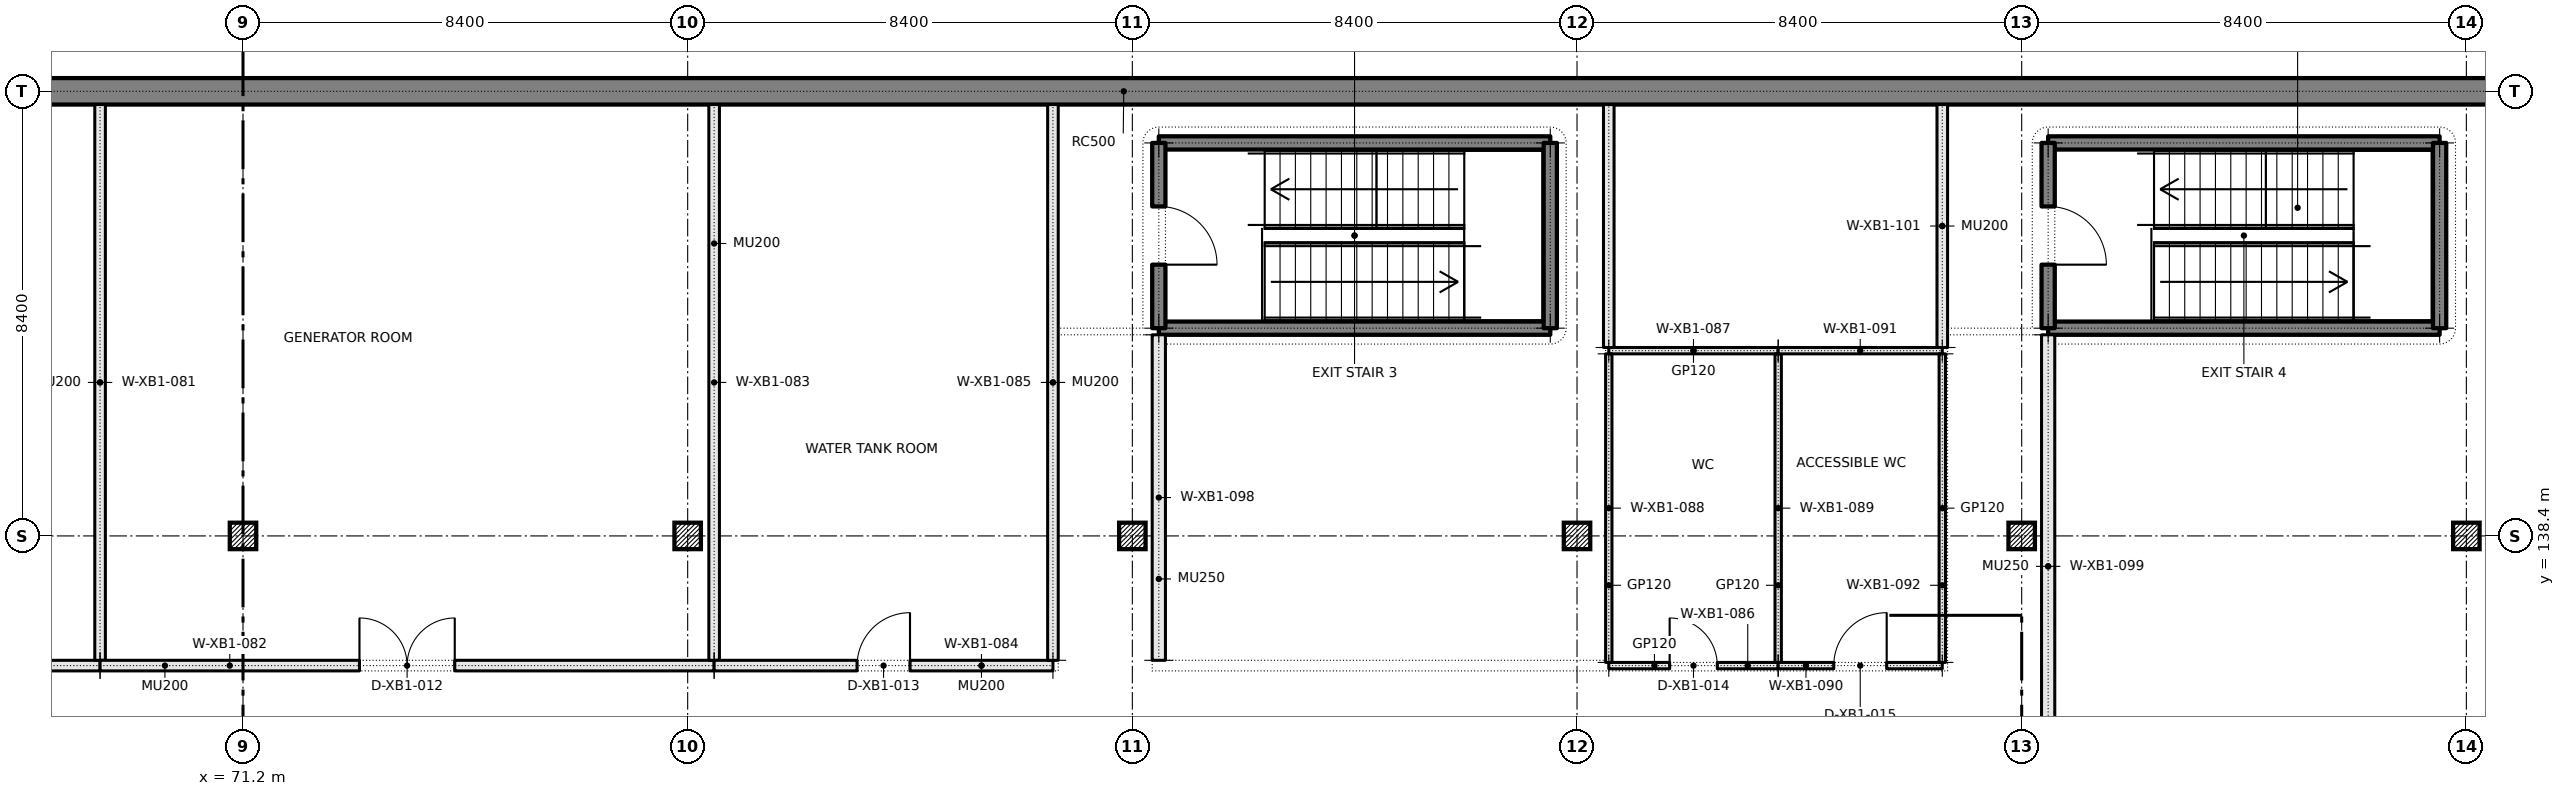
"""IFC4 building model, lengths in metres.
Left out: names, types, materials, properties, quantities, classifications, styles, units other than length and angle.
Written with IfcOpenShell. Run it as: python <this file> out.ifc"""

import sys

from ifc_helpers import new_model, si_unit, direction, frame, frame_2d, origin, origin_2d, place, context, subcontext, project, spatial, rectangle, extrude, element, fill, save


model = new_model("IFC4")
c1 = context("Model", 3, precision=1e-05, world=origin(), true_north=direction((0.0, 1.0)))
c2 = subcontext(c1, "Body", "Model", "MODEL_VIEW")
j1 = project(units=[si_unit("LENGTHUNIT", "METRE"), si_unit("PLANEANGLEUNIT", "RADIAN")], contexts=[c1])
p1 = place(None, origin())
s1 = spatial("IfcSite", under=j1, at=p1, CompositionType="ELEMENT")
p2 = place(p1, origin())
s2 = spatial("IfcBuilding", under=s1, at=p2, CompositionType="ELEMENT")
p3 = place(p2, frame((0.0, 0.0, -4.6)))
s3 = spatial("IfcBuildingStorey", under=s2, at=p3, CompositionType="ELEMENT", Elevation=-4.6)
p4 = place(p3, frame((4.25, 146.8, 0.0), z_axis=(0.0, 0.0, 1.0), x_axis=(1.0, 0.0, 0.0)))
e1 = element("IfcWall", 1, at=p4, inside=s3, PredefinedType="SOLIDWALL", context=c2, shape_type="SweptSolid", body=[
    extrude(rectangle(XDim=110.2, YDim=0.5, at=frame_2d((55.1, 0.0))), origin(), (0.0, 0.0, 1.0), 4.19),
])
for number, where, z_axis, x_axis in (
    (2, (71.2, 138.4, 0.0), (0.0, 0.0, 1.0), (1.0, 0.0, 0.0)),
    (3, (79.6, 138.4, 0.0), (0.0, 0.0, 1.0), (1.0, 0.0, 0.0)),
    (4, (88.0, 138.4, 0.0), (0.0, 0.0, 1.0), (1.0, 0.0, 0.0)),
    (5, (96.4, 138.4, 0.0), (0.0, 0.0, 1.0), (1.0, 0.0, 0.0)),
    (6, (104.8, 138.4, 0.0), (0.0, 0.0, 1.0), (1.0, 0.0, 0.0)),
    (7, (113.2, 138.4, 0.0), (0.0, 0.0, 1.0), (1.0, 0.0, 0.0)),
):
    element("IfcColumn", number, at=place(p3, frame(where, z_axis=z_axis, x_axis=x_axis)), inside=s3, PredefinedType="COLUMN", context=c2, shape_type="SweptSolid", body=[
        extrude(rectangle(XDim=0.5, YDim=0.5, at=origin_2d()), origin(), (0.0, 0.0, 1.0), 4.6),
    ])
for number, where, z_axis, x_axis in (
    (8, (88.5, 142.325, 0.0), (0.0, 0.0, 1.0), (1.0, 0.0, 0.0)),
    (9, (88.5, 145.825, 0.0), (0.0, 0.0, 1.0), (1.0, 0.0, 0.0)),
):
    element("IfcWall", number, at=place(p3, frame(where, z_axis=z_axis, x_axis=x_axis)), inside=s3, PredefinedType="SOLIDWALL", context=c2, shape_type="SweptSolid", body=[
        extrude(rectangle(XDim=7.395, YDim=0.25, at=frame_2d((3.698, 0.0))), origin(), (0.0, 0.0, 1.0), 4.19),
    ])
p5 = place(p3, frame((88.5, 142.325, 0.0), z_axis=(0.0, 0.0, 1.0), x_axis=(0.0, 1.0, 0.0)))
e10 = element("IfcWall", 10, at=p5, inside=s3, PredefinedType="SOLIDWALL", context=c2, shape_type="SweptSolid", body=[
    extrude(rectangle(XDim=3.5, YDim=0.25, at=frame_2d((1.75, 0.0))), origin(), (0.0, 0.0, 1.0), 4.19),
])
p6 = place(p5, frame((1.2, 0.0, 0.0)))
e11 = element("IfcOpeningElement", 11, at=p6, cuts=e10, PredefinedType="OPENING", context=c2, shape_type="SweptSolid", body=[
    extrude(rectangle(XDim=1.1, YDim=2.1, at=frame_2d((0.55, 1.05))), frame((0.0, 0.135, 0.0), z_axis=(0.0, -1.0, 0.0), x_axis=(1.0, 0.0, 0.0)), (0.0, 0.0, 1.0), 0.27),
])
p7 = place(p3, frame((95.895, 142.325, 0.0), z_axis=(0.0, 0.0, 1.0), x_axis=(0.0, 1.0, 0.0)))
e12 = element("IfcWall", 12, at=p7, inside=s3, PredefinedType="SOLIDWALL", context=c2, shape_type="SweptSolid", body=[
    extrude(rectangle(XDim=3.5, YDim=0.25, at=frame_2d((1.75, 0.0))), origin(), (0.0, 0.0, 1.0), 4.19),
])
for number, where, z_axis, x_axis in (
    (13, (105.3, 142.325, 0.0), (0.0, 0.0, 1.0), (1.0, 0.0, 0.0)),
    (14, (105.3, 145.825, 0.0), (0.0, 0.0, 1.0), (1.0, 0.0, 0.0)),
):
    element("IfcWall", number, at=place(p3, frame(where, z_axis=z_axis, x_axis=x_axis)), inside=s3, PredefinedType="SOLIDWALL", context=c2, shape_type="SweptSolid", body=[
        extrude(rectangle(XDim=7.395, YDim=0.25, at=frame_2d((3.698, 0.0))), origin(), (0.0, 0.0, 1.0), 4.19),
    ])
p8 = place(p3, frame((105.3, 142.325, 0.0), z_axis=(0.0, 0.0, 1.0), x_axis=(0.0, 1.0, 0.0)))
e15 = element("IfcWall", 15, at=p8, inside=s3, PredefinedType="SOLIDWALL", context=c2, shape_type="SweptSolid", body=[
    extrude(rectangle(XDim=3.5, YDim=0.25, at=frame_2d((1.75, 0.0))), origin(), (0.0, 0.0, 1.0), 4.19),
])
p9 = place(p8, frame((1.2, 0.0, 0.0)))
e16 = element("IfcOpeningElement", 16, at=p9, cuts=e15, PredefinedType="OPENING", context=c2, shape_type="SweptSolid", body=[
    extrude(rectangle(XDim=1.1, YDim=2.1, at=frame_2d((0.55, 1.05))), frame((0.0, 0.135, 0.0), z_axis=(0.0, -1.0, 0.0), x_axis=(1.0, 0.0, 0.0)), (0.0, 0.0, 1.0), 0.27),
])
p10 = place(p3, frame((112.695, 142.325, 0.0), z_axis=(0.0, 0.0, 1.0), x_axis=(0.0, 1.0, 0.0)))
e17 = element("IfcWall", 17, at=p10, inside=s3, PredefinedType="SOLIDWALL", context=c2, shape_type="SweptSolid", body=[
    extrude(rectangle(XDim=3.5, YDim=0.25, at=frame_2d((1.75, 0.0))), origin(), (0.0, 0.0, 1.0), 4.19),
])
p11 = place(p3, frame((60.9, 135.95, 0.0), z_axis=(0.0, 0.0, 1.0), x_axis=(1.0, 0.0, 0.0)))
e18 = element("IfcWall", 18, at=p11, inside=s3, PredefinedType="SOLIDWALL", context=c2, shape_type="SweptSolid", body=[
    extrude(rectangle(XDim=7.6, YDim=0.2, at=frame_2d((3.8, 0.0))), origin(), (0.0, 0.0, 1.0), 4.19),
])
p12 = place(p11, frame((3.3, 0.0, 0.0)))
e19 = element("IfcOpeningElement", 19, at=p12, cuts=e18, PredefinedType="OPENING", context=c2, shape_type="SweptSolid", body=[
    extrude(rectangle(XDim=1.0, YDim=2.1, at=frame_2d((0.5, 1.05))), frame((0.0, 0.11, 0.0), z_axis=(0.0, -1.0, 0.0), x_axis=(1.0, 0.0, 0.0)), (0.0, 0.0, 1.0), 0.22),
])
p13 = place(p3, frame((68.5, 136.05, 0.0), z_axis=(0.0, 0.0, 1.0), x_axis=(0.0, 1.0, 0.0)))
e20 = element("IfcWall", 20, at=p13, inside=s3, PredefinedType="SOLIDWALL", context=c2, shape_type="SweptSolid", body=[
    extrude(rectangle(XDim=10.5, YDim=0.2, at=frame_2d((5.25, 0.0))), origin(), (0.0, 0.0, 1.0), 4.19),
])
p14 = place(p3, frame((68.5, 135.95, 0.0), z_axis=(0.0, 0.0, 1.0), x_axis=(1.0, 0.0, 0.0)))
e21 = element("IfcWall", 21, at=p14, inside=s3, PredefinedType="SOLIDWALL", context=c2, shape_type="SweptSolid", body=[
    extrude(rectangle(XDim=11.6, YDim=0.2, at=frame_2d((5.8, 0.0))), origin(), (0.0, 0.0, 1.0), 4.19),
])
p15 = place(p14, frame((4.9, 0.0, 0.0)))
e22 = element("IfcOpeningElement", 22, at=p15, cuts=e21, PredefinedType="OPENING", context=c2, shape_type="SweptSolid", body=[
    extrude(rectangle(XDim=1.8, YDim=2.1, at=frame_2d((0.9, 1.05))), frame((0.0, 0.11, 0.0), z_axis=(0.0, -1.0, 0.0), x_axis=(1.0, 0.0, 0.0)), (0.0, 0.0, 1.0), 0.22),
])
p16 = place(p3, frame((80.1, 136.05, 0.0), z_axis=(0.0, 0.0, 1.0), x_axis=(0.0, 1.0, 0.0)))
e23 = element("IfcWall", 23, at=p16, inside=s3, PredefinedType="SOLIDWALL", context=c2, shape_type="SweptSolid", body=[
    extrude(rectangle(XDim=10.5, YDim=0.2, at=frame_2d((5.25, 0.0))), origin(), (0.0, 0.0, 1.0), 4.19),
])
p17 = place(p3, frame((80.1, 135.95, 0.0), z_axis=(0.0, 0.0, 1.0), x_axis=(1.0, 0.0, 0.0)))
e24 = element("IfcWall", 24, at=p17, inside=s3, PredefinedType="SOLIDWALL", context=c2, shape_type="SweptSolid", body=[
    extrude(rectangle(XDim=6.4, YDim=0.2, at=frame_2d((3.2, 0.0))), origin(), (0.0, 0.0, 1.0), 4.19),
])
p18 = place(p17, frame((2.7, 0.0, 0.0)))
e25 = element("IfcOpeningElement", 25, at=p18, cuts=e24, PredefinedType="OPENING", context=c2, shape_type="SweptSolid", body=[
    extrude(rectangle(XDim=1.0, YDim=2.1, at=frame_2d((0.5, 1.05))), frame((0.0, 0.11, 0.0), z_axis=(0.0, -1.0, 0.0), x_axis=(1.0, 0.0, 0.0)), (0.0, 0.0, 1.0), 0.22),
])
p19 = place(p3, frame((86.5, 136.05, 0.0), z_axis=(0.0, 0.0, 1.0), x_axis=(0.0, 1.0, 0.0)))
e26 = element("IfcWall", 26, at=p19, inside=s3, PredefinedType="SOLIDWALL", context=c2, shape_type="SweptSolid", body=[
    extrude(rectangle(XDim=10.5, YDim=0.2, at=frame_2d((5.25, 0.0))), origin(), (0.0, 0.0, 1.0), 4.19),
])
p20 = place(p3, frame((97.0, 135.95, 0.0), z_axis=(0.0, 0.0, 1.0), x_axis=(1.0, 0.0, 0.0)))
e27 = element("IfcWall", 27, at=p20, inside=s3, PredefinedType="PARTITIONING", context=c2, shape_type="SweptSolid", body=[
    extrude(rectangle(XDim=3.2, YDim=0.12, at=frame_2d((1.6, 0.0))), origin(), (0.0, 0.0, 1.0), 4.19),
])
p21 = place(p20, frame((1.15, 0.0, 0.0)))
e28 = element("IfcOpeningElement", 28, at=p21, cuts=e27, PredefinedType="OPENING", context=c2, shape_type="SweptSolid", body=[
    extrude(rectangle(XDim=0.9, YDim=2.1, at=frame_2d((0.45, 1.05))), frame((0.0, 0.07, 0.0), z_axis=(0.0, -1.0, 0.0), x_axis=(1.0, 0.0, 0.0)), (0.0, 0.0, 1.0), 0.14),
])
p22 = place(p3, frame((97.0, 141.9, 0.0), z_axis=(0.0, 0.0, 1.0), x_axis=(1.0, 0.0, 0.0)))
e29 = element("IfcWall", 29, at=p22, inside=s3, PredefinedType="PARTITIONING", context=c2, shape_type="SweptSolid", body=[
    extrude(rectangle(XDim=3.2, YDim=0.12, at=frame_2d((1.6, 0.0))), origin(), (0.0, 0.0, 1.0), 4.19),
])
for number, where, z_axis, x_axis in (
    (30, (97.0, 136.01, 0.0), (0.0, 0.0, 1.0), (0.0, 1.0, 0.0)),
    (31, (100.2, 136.01, 0.0), (0.0, 0.0, 1.0), (0.0, 1.0, 0.0)),
):
    element("IfcWall", number, at=place(p3, frame(where, z_axis=z_axis, x_axis=x_axis)), inside=s3, PredefinedType="PARTITIONING", context=c2, shape_type="SweptSolid", body=[
        extrude(rectangle(XDim=5.83, YDim=0.12, at=frame_2d((2.915, 0.0))), origin(), (0.0, 0.0, 1.0), 4.19),
    ])
p23 = place(p3, frame((100.2, 135.95, 0.0), z_axis=(0.0, 0.0, 1.0), x_axis=(1.0, 0.0, 0.0)))
e32 = element("IfcWall", 32, at=p23, inside=s3, PredefinedType="PARTITIONING", context=c2, shape_type="SweptSolid", body=[
    extrude(rectangle(XDim=3.1, YDim=0.12, at=frame_2d((1.55, 0.0))), origin(), (0.0, 0.0, 1.0), 4.19),
])
p24 = place(p23, frame((1.05, 0.0, 0.0)))
e33 = element("IfcOpeningElement", 33, at=p24, cuts=e32, PredefinedType="OPENING", context=c2, shape_type="SweptSolid", body=[
    extrude(rectangle(XDim=1.0, YDim=2.1, at=frame_2d((0.5, 1.05))), frame((0.0, 0.07, 0.0), z_axis=(0.0, -1.0, 0.0), x_axis=(1.0, 0.0, 0.0)), (0.0, 0.0, 1.0), 0.14),
])
p25 = place(p3, frame((100.2, 141.9, 0.0), z_axis=(0.0, 0.0, 1.0), x_axis=(1.0, 0.0, 0.0)))
e34 = element("IfcWall", 34, at=p25, inside=s3, PredefinedType="PARTITIONING", context=c2, shape_type="SweptSolid", body=[
    extrude(rectangle(XDim=3.1, YDim=0.12, at=frame_2d((1.55, 0.0))), origin(), (0.0, 0.0, 1.0), 4.19),
])
p26 = place(p3, frame((103.3, 136.01, 0.0), z_axis=(0.0, 0.0, 1.0), x_axis=(0.0, 1.0, 0.0)))
e35 = element("IfcWall", 35, at=p26, inside=s3, PredefinedType="PARTITIONING", context=c2, shape_type="SweptSolid", body=[
    extrude(rectangle(XDim=5.83, YDim=0.12, at=frame_2d((2.915, 0.0))), origin(), (0.0, 0.0, 1.0), 4.19),
])
p27 = place(p3, frame((88.5, 136.05, 0.0), z_axis=(0.0, 0.0, 1.0), x_axis=(0.0, 1.0, 0.0)))
e36 = element("IfcWall", 36, at=p27, inside=s3, PredefinedType="SOLIDWALL", context=c2, shape_type="SweptSolid", body=[
    extrude(rectangle(XDim=6.15, YDim=0.25, at=frame_2d((3.075, 0.0))), origin(), (0.0, 0.0, 1.0), 4.19),
])
p28 = place(p3, frame((105.3, 133.45, 0.0), z_axis=(0.0, 0.0, 1.0), x_axis=(0.0, 1.0, 0.0)))
e37 = element("IfcWall", 37, at=p28, inside=s3, PredefinedType="SOLIDWALL", context=c2, shape_type="SweptSolid", body=[
    extrude(rectangle(XDim=8.75, YDim=0.25, at=frame_2d((4.375, 0.0))), origin(), (0.0, 0.0, 1.0), 4.19),
])
for number, where, z_axis, x_axis in (
    (38, (97.0, 141.96, 0.0), (0.0, 0.0, 1.0), (0.0, 1.0, 0.0)),
    (39, (103.3, 141.96, 0.0), (0.0, 0.0, 1.0), (0.0, 1.0, 0.0)),
):
    element("IfcWall", number, at=place(p3, frame(where, z_axis=z_axis, x_axis=x_axis)), inside=s3, PredefinedType="SOLIDWALL", context=c2, shape_type="SweptSolid", body=[
        extrude(rectangle(XDim=4.59, YDim=0.2, at=frame_2d((2.295, 0.0))), origin(), (0.0, 0.0, 1.0), 4.19),
    ])
p29 = place(p6, frame((1.1, 0.0, 0.0), z_axis=(0.0, 0.0, 1.0), x_axis=(-1.0, 0.0, 0.0)))
e40 = element("IfcDoor", 40, at=p29, inside=s3, OperationType="SINGLE_SWING_RIGHT", PredefinedType="DOOR", context=c2, shape_type="SweptSolid", body=[
    extrude(rectangle(XDim=1.1, YDim=2.1, at=frame_2d((0.55, 1.05))), frame((0.0, 0.025, 0.0), z_axis=(0.0, -1.0, 0.0), x_axis=(1.0, 0.0, 0.0)), (0.0, 0.0, 1.0), 0.05),
])
fill(e11, e40)
p30 = place(p9, frame((1.1, 0.0, 0.0), z_axis=(0.0, 0.0, 1.0), x_axis=(-1.0, 0.0, 0.0)))
e41 = element("IfcDoor", 41, at=p30, inside=s3, OperationType="SINGLE_SWING_RIGHT", PredefinedType="DOOR", context=c2, shape_type="SweptSolid", body=[
    extrude(rectangle(XDim=1.1, YDim=2.1, at=frame_2d((0.55, 1.05))), frame((0.0, 0.025, 0.0), z_axis=(0.0, -1.0, 0.0), x_axis=(1.0, 0.0, 0.0)), (0.0, 0.0, 1.0), 0.05),
])
fill(e16, e41)
p31 = place(p15, origin())
e42 = element("IfcDoor", 42, at=p31, inside=s3, OperationType="DOUBLE_DOOR_SINGLE_SWING", PredefinedType="DOOR", context=c2, shape_type="SweptSolid", body=[
    extrude(rectangle(XDim=1.8, YDim=2.1, at=frame_2d((0.9, 1.05))), frame((0.0, 0.025, 0.0), z_axis=(0.0, -1.0, 0.0), x_axis=(1.0, 0.0, 0.0)), (0.0, 0.0, 1.0), 0.05),
])
fill(e22, e42)
p32 = place(p18, origin())
e43 = element("IfcDoor", 43, at=p32, inside=s3, OperationType="SINGLE_SWING_RIGHT", PredefinedType="DOOR", context=c2, shape_type="SweptSolid", body=[
    extrude(rectangle(XDim=1.0, YDim=2.1, at=frame_2d((0.5, 1.05))), frame((0.0, 0.025, 0.0), z_axis=(0.0, -1.0, 0.0), x_axis=(1.0, 0.0, 0.0)), (0.0, 0.0, 1.0), 0.05),
])
fill(e25, e43)
p33 = place(p21, origin())
e44 = element("IfcDoor", 44, at=p33, inside=s3, OperationType="SINGLE_SWING_LEFT", PredefinedType="DOOR", context=c2, shape_type="SweptSolid", body=[
    extrude(rectangle(XDim=0.9, YDim=2.1, at=frame_2d((0.45, 1.05))), frame((0.0, 0.025, 0.0), z_axis=(0.0, -1.0, 0.0), x_axis=(1.0, 0.0, 0.0)), (0.0, 0.0, 1.0), 0.05),
])
fill(e28, e44)
p34 = place(p24, origin())
e45 = element("IfcDoor", 45, at=p34, inside=s3, OperationType="SINGLE_SWING_RIGHT", PredefinedType="DOOR", context=c2, shape_type="SweptSolid", body=[
    extrude(rectangle(XDim=1.0, YDim=2.1, at=frame_2d((0.5, 1.05))), frame((0.0, 0.025, 0.0), z_axis=(0.0, -1.0, 0.0), x_axis=(1.0, 0.0, 0.0)), (0.0, 0.0, 1.0), 0.05),
])
fill(e33, e45)
save(model, sys.argv[1])
